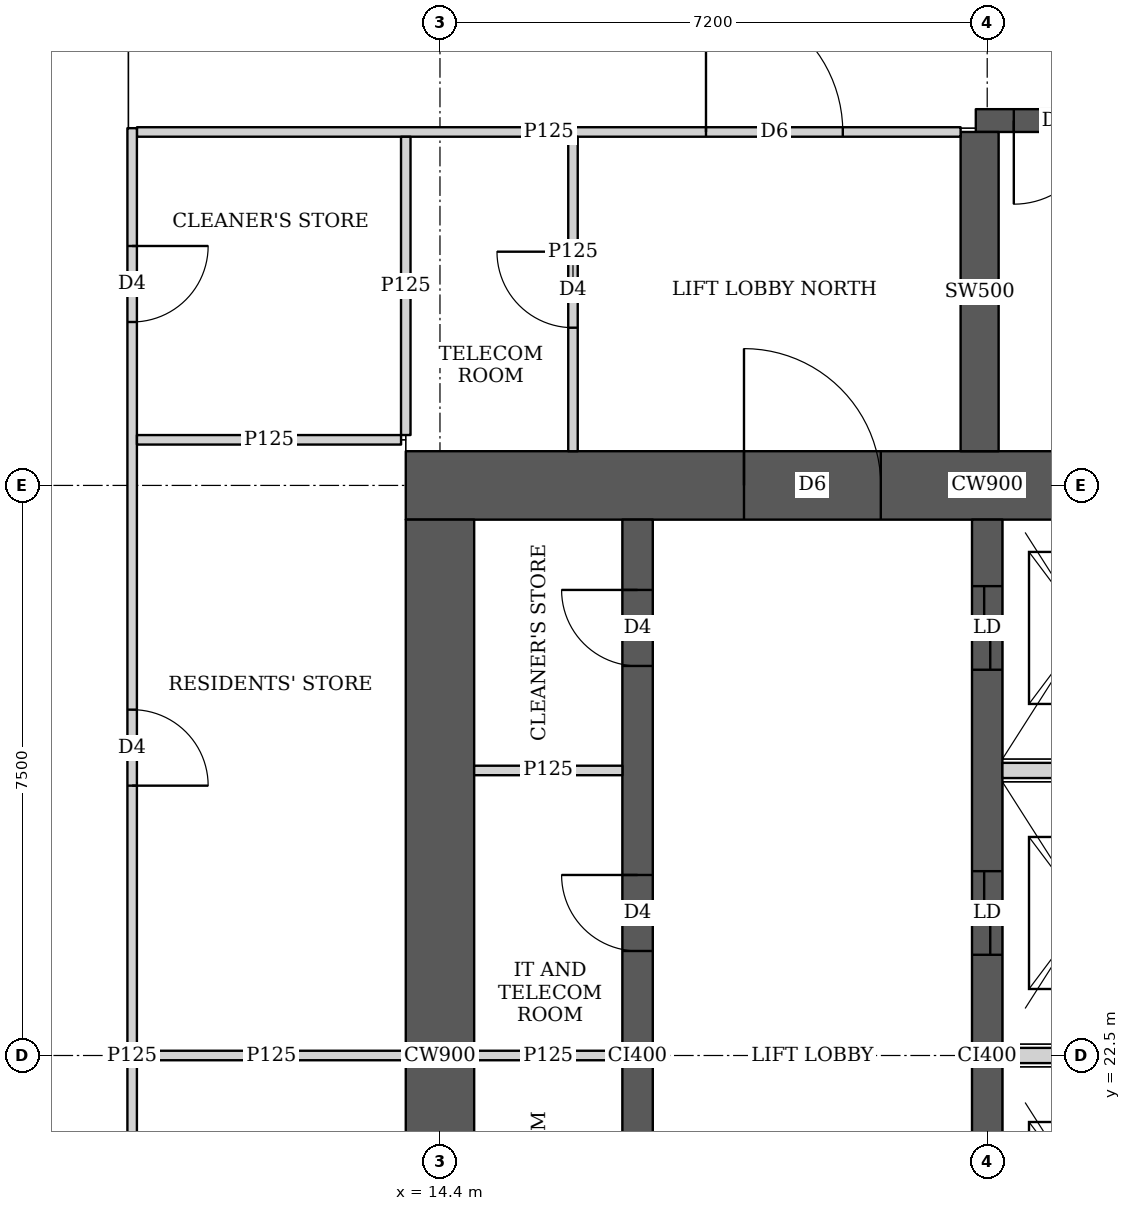
"""IFC4 building model, lengths in metres.
Left out: names, types, materials, properties, quantities, classifications, styles, units other than length and angle.
Written with IfcOpenShell. Run it as: python <this file> out.ifc"""

import sys

from ifc_helpers import new_model, si_unit, direction, frame, frame_2d, origin, place, context, subcontext, project, spatial, rectangle, extrude, element, fill, save


model = new_model("IFC4")
c1 = context("Model", 3, precision=1e-05, world=origin(), true_north=direction((0.0, 1.0)))
c2 = subcontext(c1, "Body", "Model", "MODEL_VIEW")
j1 = project(units=[si_unit("LENGTHUNIT", "METRE"), si_unit("PLANEANGLEUNIT", "RADIAN")], contexts=[c1])
p1 = place(None, origin())
s1 = spatial("IfcSite", under=j1, at=p1, CompositionType="ELEMENT")
p2 = place(p1, origin())
s2 = spatial("IfcBuilding", under=s1, at=p2, CompositionType="ELEMENT")
p3 = place(p2, frame((0.0, 0.0, 184.55)))
s3 = spatial("IfcBuildingStorey", under=s2, at=p3, CompositionType="ELEMENT", Elevation=184.55)
p4 = place(p3, frame((13.95, 30.0, 0.0), z_axis=(0.0, 0.0, 1.0), x_axis=(1.0, 0.0, 0.0)))
e1 = element("IfcWall", 1, at=p4, inside=s3, PredefinedType="SHEAR", context=c2, shape_type="SweptSolid", body=[
    extrude(rectangle(XDim=15.3, YDim=0.9, at=frame_2d((7.65, 0.0))), origin(), (0.0, 0.0, 1.0), 3.75),
])
p5 = place(p4, frame((4.45, 0.0, 0.0)))
e2 = element("IfcOpeningElement", 2, at=p5, cuts=e1, PredefinedType="OPENING", context=c2, shape_type="SweptSolid", body=[
    extrude(rectangle(XDim=1.8, YDim=2.1, at=frame_2d((0.9, 1.05))), frame((0.0, 0.46, 0.0), z_axis=(0.0, -1.0, 0.0), x_axis=(1.0, 0.0, 0.0)), (0.0, 0.0, 1.0), 0.92),
])
p6 = place(p4, frame((10.7, 0.0, 0.0)))
e3 = element("IfcOpeningElement", 3, at=p6, cuts=e1, PredefinedType="OPENING", context=c2, shape_type="SweptSolid", body=[
    extrude(rectangle(XDim=1.1, YDim=2.1, at=frame_2d((0.55, 1.05))), frame((0.0, 0.46, 0.0), z_axis=(0.0, -1.0, 0.0), x_axis=(1.0, 0.0, 0.0)), (0.0, 0.0, 1.0), 0.92),
])
p7 = place(p3, frame((14.4, 15.45, 0.0), z_axis=(0.0, 0.0, 1.0), x_axis=(0.0, 1.0, 0.0)))
e4 = element("IfcWall", 4, at=p7, inside=s3, PredefinedType="SHEAR", context=c2, shape_type="SweptSolid", body=[
    extrude(rectangle(XDim=14.1, YDim=0.9, at=frame_2d((7.05, 0.0))), origin(), (0.0, 0.0, 1.0), 3.75),
])
p8 = place(p3, frame((17.0, 15.45, 0.0), z_axis=(0.0, 0.0, 1.0), x_axis=(0.0, 1.0, 0.0)))
e5 = element("IfcWall", 5, at=p8, inside=s3, PredefinedType="SHEAR", context=c2, shape_type="SweptSolid", body=[
    extrude(rectangle(XDim=14.1, YDim=0.4, at=frame_2d((7.05, 0.0))), origin(), (0.0, 0.0, 1.0), 3.75),
])
p9 = place(p8, frame((0.925, 0.0, 0.0)))
e6 = element("IfcOpeningElement", 6, at=p9, cuts=e5, PredefinedType="OPENING", context=c2, shape_type="SweptSolid", body=[
    extrude(rectangle(XDim=1.0, YDim=2.1, at=frame_2d((0.5, 1.05))), frame((0.0, 0.21, 0.0), z_axis=(0.0, -1.0, 0.0), x_axis=(1.0, 0.0, 0.0)), (0.0, 0.0, 1.0), 0.42),
])
p10 = place(p8, frame((4.675, 0.0, 0.0)))
e7 = element("IfcOpeningElement", 7, at=p10, cuts=e5, PredefinedType="OPENING", context=c2, shape_type="SweptSolid", body=[
    extrude(rectangle(XDim=1.0, YDim=2.1, at=frame_2d((0.5, 1.05))), frame((0.0, 0.21, 0.0), z_axis=(0.0, -1.0, 0.0), x_axis=(1.0, 0.0, 0.0)), (0.0, 0.0, 1.0), 0.42),
])
p11 = place(p8, frame((8.425, 0.0, 0.0)))
e8 = element("IfcOpeningElement", 8, at=p11, cuts=e5, PredefinedType="OPENING", context=c2, shape_type="SweptSolid", body=[
    extrude(rectangle(XDim=1.0, YDim=2.1, at=frame_2d((0.5, 1.05))), frame((0.0, 0.21, 0.0), z_axis=(0.0, -1.0, 0.0), x_axis=(1.0, 0.0, 0.0)), (0.0, 0.0, 1.0), 0.42),
])
p12 = place(p8, frame((12.175, 0.0, 0.0)))
e9 = element("IfcOpeningElement", 9, at=p12, cuts=e5, PredefinedType="OPENING", context=c2, shape_type="SweptSolid", body=[
    extrude(rectangle(XDim=1.0, YDim=2.1, at=frame_2d((0.5, 1.05))), frame((0.0, 0.21, 0.0), z_axis=(0.0, -1.0, 0.0), x_axis=(1.0, 0.0, 0.0)), (0.0, 0.0, 1.0), 0.42),
])
p13 = place(p3, frame((21.6, 15.45, 0.0), z_axis=(0.0, 0.0, 1.0), x_axis=(0.0, 1.0, 0.0)))
e10 = element("IfcWall", 10, at=p13, inside=s3, PredefinedType="SHEAR", context=c2, shape_type="SweptSolid", body=[
    extrude(rectangle(XDim=14.1, YDim=0.4, at=frame_2d((7.05, 0.0))), origin(), (0.0, 0.0, 1.0), 3.75),
])
p14 = place(p13, frame((0.875, 0.0, 0.0)))
e11 = element("IfcOpeningElement", 11, at=p14, cuts=e10, PredefinedType="OPENING", context=c2, shape_type="SweptSolid", body=[
    extrude(rectangle(XDim=1.1, YDim=2.1, at=frame_2d((0.55, 1.05))), frame((0.0, 0.21, 0.0), z_axis=(0.0, -1.0, 0.0), x_axis=(1.0, 0.0, 0.0)), (0.0, 0.0, 1.0), 0.42),
])
p15 = place(p13, frame((4.625, 0.0, 0.0)))
e12 = element("IfcOpeningElement", 12, at=p15, cuts=e10, PredefinedType="OPENING", context=c2, shape_type="SweptSolid", body=[
    extrude(rectangle(XDim=1.1, YDim=2.1, at=frame_2d((0.55, 1.05))), frame((0.0, 0.21, 0.0), z_axis=(0.0, -1.0, 0.0), x_axis=(1.0, 0.0, 0.0)), (0.0, 0.0, 1.0), 0.42),
])
p16 = place(p13, frame((8.375, 0.0, 0.0)))
e13 = element("IfcOpeningElement", 13, at=p16, cuts=e10, PredefinedType="OPENING", context=c2, shape_type="SweptSolid", body=[
    extrude(rectangle(XDim=1.1, YDim=2.1, at=frame_2d((0.55, 1.05))), frame((0.0, 0.21, 0.0), z_axis=(0.0, -1.0, 0.0), x_axis=(1.0, 0.0, 0.0)), (0.0, 0.0, 1.0), 0.42),
])
p17 = place(p13, frame((12.125, 0.0, 0.0)))
e14 = element("IfcOpeningElement", 14, at=p17, cuts=e10, PredefinedType="OPENING", context=c2, shape_type="SweptSolid", body=[
    extrude(rectangle(XDim=1.1, YDim=2.1, at=frame_2d((0.55, 1.05))), frame((0.0, 0.21, 0.0), z_axis=(0.0, -1.0, 0.0), x_axis=(1.0, 0.0, 0.0)), (0.0, 0.0, 1.0), 0.42),
])
p18 = place(p3, frame((21.45, 34.8, 0.0), z_axis=(0.0, 0.0, 1.0), x_axis=(1.0, 0.0, 0.0)))
e15 = element("IfcWall", 15, at=p18, inside=s3, PredefinedType="SHEAR", context=c2, shape_type="SweptSolid", body=[
    extrude(rectangle(XDim=7.5, YDim=0.3, at=frame_2d((3.75, 0.0))), origin(), (0.0, 0.0, 1.0), 3.75),
])
p19 = place(p18, frame((0.5, 0.0, 0.0)))
e16 = element("IfcOpeningElement", 16, at=p19, cuts=e15, PredefinedType="OPENING", context=c2, shape_type="SweptSolid", body=[
    extrude(rectangle(XDim=1.1, YDim=2.1, at=frame_2d((0.55, 1.05))), frame((0.0, 0.16, 0.0), z_axis=(0.0, -1.0, 0.0), x_axis=(1.0, 0.0, 0.0)), (0.0, 0.0, 1.0), 0.32),
])
p20 = place(p3, frame((21.5, 30.45, 0.0), z_axis=(0.0, 0.0, 1.0), x_axis=(0.0, 1.0, 0.0)))
e17 = element("IfcWall", 17, at=p20, inside=s3, PredefinedType="SHEAR", context=c2, shape_type="SweptSolid", body=[
    extrude(rectangle(XDim=4.2, YDim=0.5, at=frame_2d((2.1, 0.0))), origin(), (0.0, 0.0, 1.0), 3.75),
])
p21 = place(p3, frame((10.35, 10.3, 0.0), z_axis=(0.0, 0.0, 1.0), x_axis=(0.0, 1.0, 0.0)))
e18 = element("IfcWall", 18, at=p21, inside=s3, PredefinedType="PARTITIONING", context=c2, shape_type="SweptSolid", body=[
    extrude(rectangle(XDim=24.4, YDim=0.125, at=frame_2d((12.2, 0.0))), origin(), (0.0, 0.0, 1.0), 3.45),
])
p22 = place(p21, frame((1.55, 0.0, 0.0)))
e19 = element("IfcOpeningElement", 19, at=p22, cuts=e18, PredefinedType="OPENING", context=c2, shape_type="SweptSolid", body=[
    extrude(rectangle(XDim=1.0, YDim=2.1, at=frame_2d((0.5, 1.05))), frame((0.0, 0.073, 0.0), z_axis=(0.0, -1.0, 0.0), x_axis=(1.0, 0.0, 0.0)), (0.0, 0.0, 1.0), 0.145),
])
p23 = place(p21, frame((7.65, 0.0, 0.0)))
e20 = element("IfcOpeningElement", 20, at=p23, cuts=e18, PredefinedType="OPENING", context=c2, shape_type="SweptSolid", body=[
    extrude(rectangle(XDim=1.0, YDim=2.1, at=frame_2d((0.5, 1.05))), frame((0.0, 0.073, 0.0), z_axis=(0.0, -1.0, 0.0), x_axis=(1.0, 0.0, 0.0)), (0.0, 0.0, 1.0), 0.145),
])
p24 = place(p21, frame((15.75, 0.0, 0.0)))
e21 = element("IfcOpeningElement", 21, at=p24, cuts=e18, PredefinedType="OPENING", context=c2, shape_type="SweptSolid", body=[
    extrude(rectangle(XDim=1.0, YDim=2.1, at=frame_2d((0.5, 1.05))), frame((0.0, 0.073, 0.0), z_axis=(0.0, -1.0, 0.0), x_axis=(1.0, 0.0, 0.0)), (0.0, 0.0, 1.0), 0.145),
])
p25 = place(p21, frame((21.85, 0.0, 0.0)))
e22 = element("IfcOpeningElement", 22, at=p25, cuts=e18, PredefinedType="OPENING", context=c2, shape_type="SweptSolid", body=[
    extrude(rectangle(XDim=1.0, YDim=2.1, at=frame_2d((0.5, 1.05))), frame((0.0, 0.073, 0.0), z_axis=(0.0, -1.0, 0.0), x_axis=(1.0, 0.0, 0.0)), (0.0, 0.0, 1.0), 0.145),
])
p26 = place(p3, frame((10.413, 22.5, 0.0), z_axis=(0.0, 0.0, 1.0), x_axis=(1.0, 0.0, 0.0)))
e23 = element("IfcWall", 23, at=p26, inside=s3, PredefinedType="PARTITIONING", context=c2, shape_type="SweptSolid", body=[
    extrude(rectangle(XDim=3.537, YDim=0.125, at=frame_2d((1.769, 0.0))), origin(), (0.0, 0.0, 1.0), 3.45),
])
p27 = place(p3, frame((10.413, 30.6, 0.0), z_axis=(0.0, 0.0, 1.0), x_axis=(1.0, 0.0, 0.0)))
e24 = element("IfcWall", 24, at=p27, inside=s3, PredefinedType="PARTITIONING", context=c2, shape_type="SweptSolid", body=[
    extrude(rectangle(XDim=3.475, YDim=0.125, at=frame_2d((1.737, 0.0))), origin(), (0.0, 0.0, 1.0), 3.45),
])
p28 = place(p3, frame((13.95, 30.663, 0.0), z_axis=(0.0, 0.0, 1.0), x_axis=(0.0, 1.0, 0.0)))
e25 = element("IfcWall", 25, at=p28, inside=s3, PredefinedType="PARTITIONING", context=c2, shape_type="SweptSolid", body=[
    extrude(rectangle(XDim=3.924, YDim=0.125, at=frame_2d((1.962, 0.0))), origin(), (0.0, 0.0, 1.0), 3.45),
])
p29 = place(p3, frame((10.413, 34.65, 0.0), z_axis=(0.0, 0.0, 1.0), x_axis=(1.0, 0.0, 0.0)))
e26 = element("IfcWall", 26, at=p29, inside=s3, PredefinedType="PARTITIONING", context=c2, shape_type="SweptSolid", body=[
    extrude(rectangle(XDim=10.837, YDim=0.125, at=frame_2d((5.418, 0.0))), origin(), (0.0, 0.0, 1.0), 3.45),
])
p30 = place(p29, frame((7.487, 0.0, 0.0)))
e27 = element("IfcOpeningElement", 27, at=p30, cuts=e26, PredefinedType="OPENING", context=c2, shape_type="SweptSolid", body=[
    extrude(rectangle(XDim=1.8, YDim=2.1, at=frame_2d((0.9, 1.05))), frame((0.0, 0.073, 0.0), z_axis=(0.0, -1.0, 0.0), x_axis=(1.0, 0.0, 0.0)), (0.0, 0.0, 1.0), 0.145),
])
p31 = place(p3, frame((16.15, 30.45, 0.0), z_axis=(0.0, 0.0, 1.0), x_axis=(0.0, 1.0, 0.0)))
e28 = element("IfcWall", 28, at=p31, inside=s3, PredefinedType="PARTITIONING", context=c2, shape_type="SweptSolid", body=[
    extrude(rectangle(XDim=4.137, YDim=0.125, at=frame_2d((2.068, 0.0))), origin(), (0.0, 0.0, 1.0), 3.45),
])
p32 = place(p31, frame((1.625, 0.0, 0.0)))
e29 = element("IfcOpeningElement", 29, at=p32, cuts=e28, PredefinedType="OPENING", context=c2, shape_type="SweptSolid", body=[
    extrude(rectangle(XDim=1.0, YDim=2.1, at=frame_2d((0.5, 1.05))), frame((0.0, 0.073, 0.0), z_axis=(0.0, -1.0, 0.0), x_axis=(1.0, 0.0, 0.0)), (0.0, 0.0, 1.0), 0.145),
])
for number, where, z_axis, x_axis in (
    (30, (14.85, 22.5, 0.0), (0.0, 0.0, 1.0), (1.0, 0.0, 0.0)),
    (31, (14.85, 26.25, 0.0), (0.0, 0.0, 1.0), (1.0, 0.0, 0.0)),
):
    element("IfcWall", number, at=place(p3, frame(where, z_axis=z_axis, x_axis=x_axis)), inside=s3, PredefinedType="PARTITIONING", context=c2, shape_type="SweptSolid", body=[
        extrude(rectangle(XDim=1.95, YDim=0.125, at=frame_2d((0.975, 0.0))), origin(), (0.0, 0.0, 1.0), 3.45),
    ])
for number, where, z_axis, x_axis in (
    (32, (21.8, 22.5, 0.0), (0.0, 0.0, 1.0), (1.0, 0.0, 0.0)),
    (33, (21.8, 26.25, 0.0), (0.0, 0.0, 1.0), (1.0, 0.0, 0.0)),
):
    element("IfcWall", number, at=place(p3, frame(where, z_axis=z_axis, x_axis=x_axis)), inside=s3, PredefinedType="SOLIDWALL", context=c2, shape_type="SweptSolid", body=[
        extrude(rectangle(XDim=2.2, YDim=0.2, at=frame_2d((1.1, 0.0))), origin(), (0.0, 0.0, 1.0), 3.45),
    ])
p33 = place(p24, origin())
e34 = element("IfcDoor", 34, at=p33, inside=s3, OperationType="SINGLE_SWING_RIGHT", PredefinedType="DOOR", context=c2, shape_type="SweptSolid", body=[
    extrude(rectangle(XDim=1.0, YDim=2.1, at=frame_2d((0.5, 1.05))), frame((0.0, 0.025, 0.0), z_axis=(0.0, -1.0, 0.0), x_axis=(1.0, 0.0, 0.0)), (0.0, 0.0, 1.0), 0.05),
])
fill(e21, e34)
p34 = place(p25, origin())
e35 = element("IfcDoor", 35, at=p34, inside=s3, OperationType="SINGLE_SWING_LEFT", PredefinedType="DOOR", context=c2, shape_type="SweptSolid", body=[
    extrude(rectangle(XDim=1.0, YDim=2.1, at=frame_2d((0.5, 1.05))), frame((0.0, 0.025, 0.0), z_axis=(0.0, -1.0, 0.0), x_axis=(1.0, 0.0, 0.0)), (0.0, 0.0, 1.0), 0.05),
])
fill(e22, e35)
p35 = place(p32, origin())
e36 = element("IfcDoor", 36, at=p35, inside=s3, OperationType="SINGLE_SWING_RIGHT", PredefinedType="DOOR", context=c2, shape_type="SweptSolid", body=[
    extrude(rectangle(XDim=1.0, YDim=2.1, at=frame_2d((0.5, 1.05))), frame((0.0, 0.025, 0.0), z_axis=(0.0, -1.0, 0.0), x_axis=(1.0, 0.0, 0.0)), (0.0, 0.0, 1.0), 0.05),
])
fill(e29, e36)
p36 = place(p30, origin())
e37 = element("IfcDoor", 37, at=p36, inside=s3, OperationType="DOUBLE_DOOR_SINGLE_SWING", PredefinedType="DOOR", context=c2, shape_type="SweptSolid", body=[
    extrude(rectangle(XDim=1.8, YDim=2.1, at=frame_2d((0.9, 1.05))), frame((0.0, 0.025, 0.0), z_axis=(0.0, -1.0, 0.0), x_axis=(1.0, 0.0, 0.0)), (0.0, 0.0, 1.0), 0.05),
])
fill(e27, e37)
p37 = place(p11, origin())
e38 = element("IfcDoor", 38, at=p37, inside=s3, OperationType="SINGLE_SWING_RIGHT", PredefinedType="DOOR", context=c2, shape_type="SweptSolid", body=[
    extrude(rectangle(XDim=1.0, YDim=2.1, at=frame_2d((0.5, 1.05))), frame((0.0, 0.025, 0.0), z_axis=(0.0, -1.0, 0.0), x_axis=(1.0, 0.0, 0.0)), (0.0, 0.0, 1.0), 0.05),
])
fill(e8, e38)
p38 = place(p12, origin())
e39 = element("IfcDoor", 39, at=p38, inside=s3, OperationType="SINGLE_SWING_RIGHT", PredefinedType="DOOR", context=c2, shape_type="SweptSolid", body=[
    extrude(rectangle(XDim=1.0, YDim=2.1, at=frame_2d((0.5, 1.05))), frame((0.0, 0.025, 0.0), z_axis=(0.0, -1.0, 0.0), x_axis=(1.0, 0.0, 0.0)), (0.0, 0.0, 1.0), 0.05),
])
fill(e9, e39)
p39 = place(p5, origin())
e40 = element("IfcDoor", 40, at=p39, inside=s3, OperationType="DOUBLE_DOOR_SINGLE_SWING", PredefinedType="DOOR", context=c2, shape_type="SweptSolid", body=[
    extrude(rectangle(XDim=1.8, YDim=2.1, at=frame_2d((0.9, 1.05))), frame((0.0, 0.025, 0.0), z_axis=(0.0, -1.0, 0.0), x_axis=(1.0, 0.0, 0.0)), (0.0, 0.0, 1.0), 0.05),
])
fill(e2, e40)
p40 = place(p16, origin())
e41 = element("IfcDoor", 41, at=p40, inside=s3, OperationType="DOUBLE_DOOR_SLIDING", PredefinedType="DOOR", context=c2, shape_type="SweptSolid", body=[
    extrude(rectangle(XDim=1.1, YDim=2.1, at=frame_2d((0.55, 1.05))), frame((0.0, 0.025, 0.0), z_axis=(0.0, -1.0, 0.0), x_axis=(1.0, 0.0, 0.0)), (0.0, 0.0, 1.0), 0.05),
])
fill(e13, e41)
p41 = place(p17, origin())
e42 = element("IfcDoor", 42, at=p41, inside=s3, OperationType="DOUBLE_DOOR_SLIDING", PredefinedType="DOOR", context=c2, shape_type="SweptSolid", body=[
    extrude(rectangle(XDim=1.1, YDim=2.1, at=frame_2d((0.55, 1.05))), frame((0.0, 0.025, 0.0), z_axis=(0.0, -1.0, 0.0), x_axis=(1.0, 0.0, 0.0)), (0.0, 0.0, 1.0), 0.05),
])
fill(e14, e42)
p42 = place(p19, origin())
e43 = element("IfcDoor", 43, at=p42, inside=s3, OperationType="SINGLE_SWING_RIGHT", PredefinedType="DOOR", context=c2, shape_type="SweptSolid", body=[
    extrude(rectangle(XDim=1.1, YDim=2.1, at=frame_2d((0.55, 1.05))), frame((0.0, 0.025, 0.0), z_axis=(0.0, -1.0, 0.0), x_axis=(1.0, 0.0, 0.0)), (0.0, 0.0, 1.0), 0.05),
])
fill(e16, e43)
save(model, sys.argv[1])
